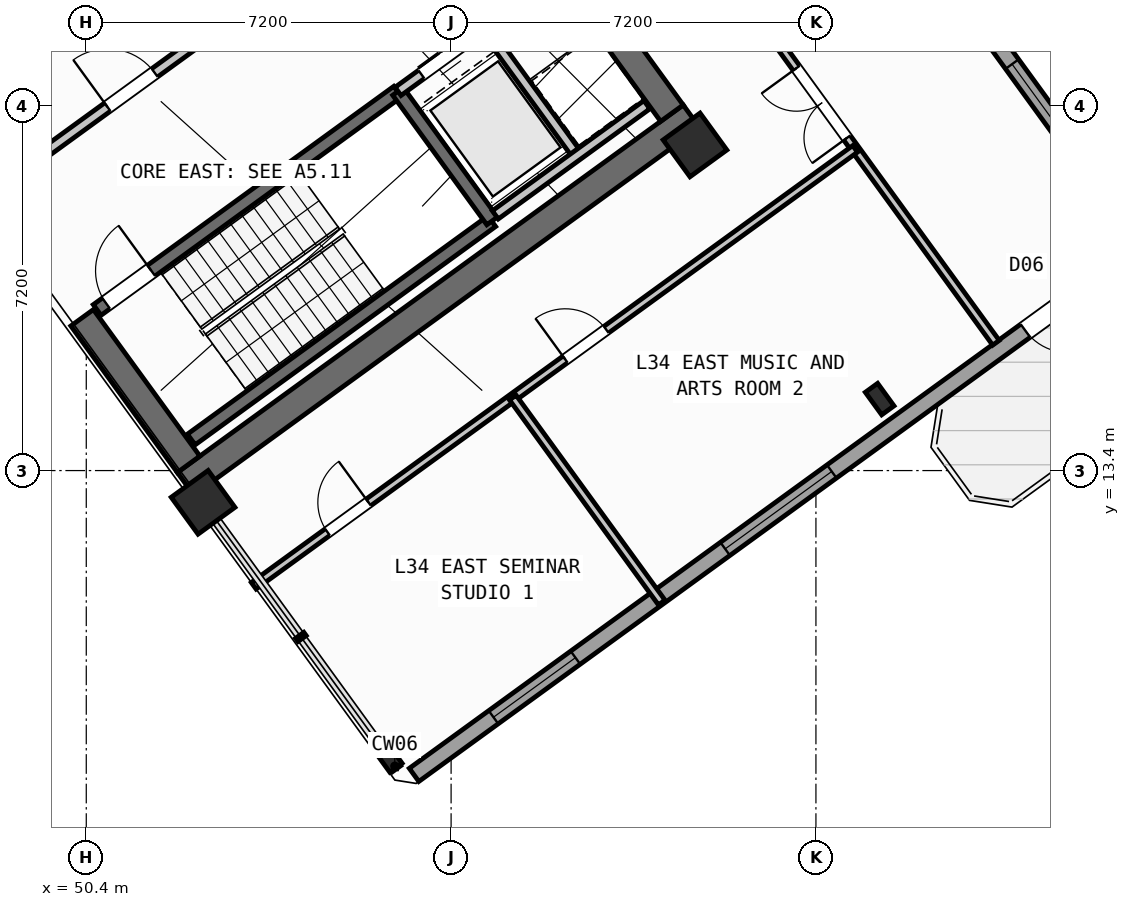
"""IFC4 building model, lengths in metres.
Left out: names, types, materials, properties, quantities, classifications, styles, units other than length and angle.
Written with IfcOpenShell. Run it as: python <this file> out.ifc"""

import sys

from ifc_helpers import new_model, si_unit, direction, frame, frame_2d, origin, origin_2d, place, context, subcontext, project, spatial, rectangle, hollow_rectangle, i_section, extrude, source, transform, mapped, element, fill, save


model = new_model("IFC4")
c1 = context("Model", 3, precision=1e-05, world=origin(), true_north=direction((0.0, 1.0)))
c2 = subcontext(c1, "Body", "Model", "MODEL_VIEW")
j1 = project(units=[si_unit("LENGTHUNIT", "METRE"), si_unit("PLANEANGLEUNIT", "RADIAN")], contexts=[c1])
p1 = place(None, origin())
s1 = spatial("IfcSite", under=j1, at=p1, CompositionType="ELEMENT")
p2 = place(p1, origin())
s2 = spatial("IfcBuilding", under=s1, at=p2, CompositionType="ELEMENT")
p3 = place(p2, frame((0.0, 0.0, 136.2)))
s3 = spatial("IfcBuildingStorey", under=s2, at=p3, CompositionType="ELEMENT", Elevation=136.2)
p4 = place(p3, frame((52.359, 13.14, 0.0), z_axis=(0.0, 0.0, 1.0), x_axis=(0.809014896919, 0.587788139183, 0.0)))
e1 = element("IfcWall", 1, at=p4, inside=s3, PredefinedType="SHEAR", context=c2, shape_type="SweptSolid", body=[
    extrude(rectangle(XDim=12.34, YDim=0.55, at=frame_2d((6.17, 0.0))), origin(), (0.0, 0.0, 1.0), 4.25),
])
for number, where, z_axis, x_axis in (
    (2, (52.42, 13.524, 0.0), (0.0, 0.0, 1.0), (-0.588, 0.809, 0.0)),
    (3, (61.958, 20.454, 0.0), (0.0, 0.0, 1.0), (-0.588, 0.809, 0.0)),
):
    element("IfcWall", number, at=place(p3, frame(where, z_axis=z_axis, x_axis=x_axis)), inside=s3, PredefinedType="SHEAR", context=c2, shape_type="SweptSolid", body=[
        extrude(rectangle(XDim=3.575, YDim=0.55, at=frame_2d((1.788, 0.0))), origin(), (0.0, 0.0, 1.0), 4.25),
    ])
m1 = source(origin(), c2, "Body", "SweptSolid", [
    extrude(i_section(OverallWidth=0.3, OverallDepth=0.55, WebThickness=0.015, FlangeThickness=0.029, at=origin_2d()), origin(), (0.0, 0.0, 1.0), 4.5),
])
p5 = place(p3, frame((56.35, 7.758, 0.0), z_axis=(0.0, 0.0, 1.0), x_axis=(0.809016994375, 0.587785252292, 0.0)))
e4 = element("IfcColumn", 4, at=p5, inside=s3, PredefinedType="COLUMN", context=c2, shape_type="MappedRepresentation", body=[
    mapped(m1, transform((0.0, 0.0, 0.0), scale=1.0)),
])
m2 = source(origin(), c2, "Body", "SweptSolid", [
    extrude(hollow_rectangle(XDim=0.9, YDim=0.9, WallThickness=0.036, at=origin_2d()), origin(), (0.0, 0.0, 1.0), 4.5),
])
p6 = place(p3, frame((52.705, 12.773, 0.0), z_axis=(0.0, 0.0, 1.0), x_axis=(0.809016994375, 0.587785252292, 0.0)))
e5 = element("IfcColumn", 5, at=p6, inside=s3, PredefinedType="COLUMN", context=c2, shape_type="MappedRepresentation", body=[
    mapped(m2, transform((0.0, 0.0, 0.0), scale=1.0)),
])
p7 = place(p3, frame((66.058, 14.811, 0.0), z_axis=(0.0, 0.0, 1.0), x_axis=(0.809016994375, 0.587785252292, 0.0)))
e6 = element("IfcColumn", 6, at=p7, inside=s3, PredefinedType="COLUMN", context=c2, shape_type="MappedRepresentation", body=[
    mapped(m1, transform((0.0, 0.0, 0.0), scale=1.0)),
])
p8 = place(p3, frame((62.414, 19.827, 0.0), z_axis=(0.0, 0.0, 1.0), x_axis=(0.809016994375, 0.587785252292, 0.0)))
e7 = element("IfcColumn", 7, at=p8, inside=s3, PredefinedType="COLUMN", context=c2, shape_type="MappedRepresentation", body=[
    mapped(m2, transform((0.0, 0.0, 0.0), scale=1.0)),
])
p9 = place(p3, frame((58.455, 35.484, 0.0), z_axis=(0.0, 0.0, 1.0), x_axis=(0.587783625747, -0.809018176127, 0.0)))
e8 = element("IfcWall", 8, at=p9, inside=s3, PredefinedType="STANDARD", context=c2, shape_type="SweptSolid", body=[
    extrude(rectangle(XDim=21.587, YDim=0.32, at=frame_2d((10.794, 0.0))), origin(), (0.0, 0.0, 1.0), 3.675),
])
p10 = place(p9, frame((2.744, 0.0, 0.7)))
e9 = element("IfcOpeningElement", 9, at=p10, cuts=e8, PredefinedType="OPENING", context=c2, shape_type="SweptSolid", body=[
    extrude(rectangle(XDim=2.6, YDim=2.0, at=frame_2d((1.3, 1.0))), frame((0.0, 0.17, 0.0), z_axis=(0.0, -1.0, 0.0), x_axis=(1.0, 0.0, 0.0)), (0.0, 0.0, 1.0), 0.34),
])
p11 = place(p9, frame((10.344, 0.0, 0.75)))
e10 = element("IfcOpeningElement", 10, at=p11, cuts=e8, PredefinedType="OPENING", context=c2, shape_type="SweptSolid", body=[
    extrude(rectangle(XDim=2.0, YDim=1.95, at=frame_2d((1.0, 0.975))), frame((0.0, 0.17, 0.0), z_axis=(0.0, -1.0, 0.0), x_axis=(1.0, 0.0, 0.0)), (0.0, 0.0, 1.0), 0.34),
])
p12 = place(p9, frame((17.381, 0.0, 0.85)))
e11 = element("IfcOpeningElement", 11, at=p12, cuts=e8, PredefinedType="OPENING", context=c2, shape_type="SweptSolid", body=[
    extrude(rectangle(XDim=1.6, YDim=1.8, at=frame_2d((0.8, 0.9))), frame((0.0, 0.17, 0.0), z_axis=(0.0, -1.0, 0.0), x_axis=(1.0, 0.0, 0.0)), (0.0, 0.0, 1.0), 0.34),
])
p13 = place(p3, frame((71.098, 17.731, 0.0), z_axis=(0.0, 0.0, 1.0), x_axis=(-0.809021120468, -0.587779573171, 0.0)))
e12 = element("IfcWall", 12, at=p13, inside=s3, PredefinedType="STANDARD", context=c2, shape_type="SweptSolid", body=[
    extrude(rectangle(XDim=17.588, YDim=0.32, at=frame_2d((8.794, 0.0))), origin(), (0.0, 0.0, 1.0), 4.25),
])
p14 = place(p13, frame((1.624, 0.0, 0.0)))
e13 = element("IfcOpeningElement", 13, at=p14, cuts=e12, PredefinedType="OPENING", context=c2, shape_type="SweptSolid", body=[
    extrude(rectangle(XDim=1.05, YDim=2.15, at=frame_2d((0.525, 1.075))), frame((0.0, 0.17, 0.0), z_axis=(0.0, -1.0, 0.0), x_axis=(1.0, 0.0, 0.0)), (0.0, 0.0, 1.0), 0.34),
])
p15 = place(p13, frame((7.399, 0.0, 0.7)))
e14 = element("IfcOpeningElement", 14, at=p15, cuts=e12, PredefinedType="OPENING", context=c2, shape_type="SweptSolid", body=[
    extrude(rectangle(XDim=2.6, YDim=2.0, at=frame_2d((1.3, 1.0))), frame((0.0, 0.17, 0.0), z_axis=(0.0, -1.0, 0.0), x_axis=(1.0, 0.0, 0.0)), (0.0, 0.0, 1.0), 0.34),
])
p16 = place(p13, frame((13.651, 0.0, 0.75)))
e15 = element("IfcOpeningElement", 15, at=p16, cuts=e12, PredefinedType="OPENING", context=c2, shape_type="SweptSolid", body=[
    extrude(rectangle(XDim=2.0, YDim=1.95, at=frame_2d((1.0, 0.975))), frame((0.0, 0.17, 0.0), z_axis=(0.0, -1.0, 0.0), x_axis=(1.0, 0.0, 0.0)), (0.0, 0.0, 1.0), 0.34),
])
p17 = place(p3, frame((52.472, 14.013, 0.0), z_axis=(0.0, 0.0, 1.0), x_axis=(0.809028366311, 0.587769599847, 0.0)))
e16 = element("IfcWall", 16, at=p17, inside=s3, PredefinedType="SHEAR", context=c2, shape_type="SweptSolid", body=[
    extrude(rectangle(XDim=7.33, YDim=0.26, at=frame_2d((3.665, 0.0))), origin(), (0.0, 0.0, 1.0), 4.25),
])
p18 = place(p3, frame((50.615, 16.57, 0.0), z_axis=(0.0, 0.0, 1.0), x_axis=(0.809028366311, 0.587769599847, 0.0)))
e17 = element("IfcWall", 17, at=p18, inside=s3, PredefinedType="SHEAR", context=c2, shape_type="SweptSolid", body=[
    extrude(rectangle(XDim=7.33, YDim=0.26, at=frame_2d((3.665, 0.0))), origin(), (0.0, 0.0, 1.0), 4.25),
])
p19 = place(p18, frame((0.22, 0.0, 0.0)))
e18 = element("IfcOpeningElement", 18, at=p19, cuts=e17, PredefinedType="OPENING", context=c2, shape_type="SweptSolid", body=[
    extrude(rectangle(XDim=1.1, YDim=2.1, at=frame_2d((0.55, 1.05))), frame((0.0, 0.14, 0.0), z_axis=(0.0, -1.0, 0.0), x_axis=(1.0, 0.0, 0.0)), (0.0, 0.0, 1.0), 0.28),
])
p20 = place(p3, frame((58.41, 18.327, 0.0), z_axis=(0.0, 0.0, 1.0), x_axis=(-0.58776738483, 0.809029975545, 0.0)))
e19 = element("IfcWall", 19, at=p20, inside=s3, PredefinedType="SHEAR", context=c2, shape_type="SweptSolid", body=[
    extrude(rectangle(XDim=3.16, YDim=0.26, at=frame_2d((1.58, 0.0))), origin(), (0.0, 0.0, 1.0), 4.25),
])
p21 = place(p3, frame((47.065, 21.407, 0.0), z_axis=(0.0, 0.0, 1.0), x_axis=(0.809032984992, 0.587763242466, 0.0)))
e20 = element("IfcWall", 20, at=p21, inside=s3, PredefinedType="STANDARD", context=c2, shape_type="SweptSolid", body=[
    extrude(rectangle(XDim=3.448, YDim=0.2, at=frame_2d((1.724, 0.0))), origin(), (0.0, 0.0, 1.0), 4.24),
])
p22 = place(p21, frame((0.458, 0.0, 0.0)))
e21 = element("IfcOpeningElement", 21, at=p22, cuts=e20, PredefinedType="OPENING", context=c2, shape_type="SweptSolid", body=[
    extrude(rectangle(XDim=1.3, YDim=2.2, at=frame_2d((0.65, 1.1))), frame((0.0, 0.11, 0.0), z_axis=(0.0, -1.0, 0.0), x_axis=(1.0, 0.0, 0.0)), (0.0, 0.0, 1.0), 0.22),
])
p23 = place(p3, frame((48.758, 19.077, 0.0), z_axis=(0.0, 0.0, 1.0), x_axis=(0.809005065155, 0.587801671104, 0.0)))
e22 = element("IfcWall", 22, at=p23, inside=s3, PredefinedType="STANDARD", context=c2, shape_type="SweptSolid", body=[
    extrude(rectangle(XDim=5.768, YDim=0.2, at=frame_2d((2.884, 0.0))), origin(), (0.0, 0.0, 1.0), 4.24),
])
p24 = place(p23, frame((2.548, 0.0, 0.0)))
e23 = element("IfcOpeningElement", 23, at=p24, cuts=e22, PredefinedType="OPENING", context=c2, shape_type="SweptSolid", body=[
    extrude(rectangle(XDim=1.15, YDim=2.1, at=frame_2d((0.575, 1.05))), frame((0.0, 0.11, 0.0), z_axis=(0.0, -1.0, 0.0), x_axis=(1.0, 0.0, 0.0)), (0.0, 0.0, 1.0), 0.22),
])
p25 = place(p3, frame((56.553, 20.884, 0.0), z_axis=(0.0, 0.0, 1.0), x_axis=(0.809023564264, 0.58777620951, 0.0)))
e24 = element("IfcWall", 24, at=p25, inside=s3, PredefinedType="STANDARD", context=c2, shape_type="SweptSolid", body=[
    extrude(rectangle(XDim=3.818, YDim=0.2, at=frame_2d((1.909, 0.0))), origin(), (0.0, 0.0, 1.0), 4.24),
])
p26 = place(p25, frame((0.57, 0.0, 0.0)))
e25 = element("IfcOpeningElement", 25, at=p26, cuts=e24, PredefinedType="OPENING", context=c2, shape_type="SweptSolid", body=[
    extrude(rectangle(XDim=1.1, YDim=2.15, at=frame_2d((0.55, 1.075))), frame((0.0, 0.11, 0.0), z_axis=(0.0, -1.0, 0.0), x_axis=(1.0, 0.0, 0.0)), (0.0, 0.0, 1.0), 0.22),
])
p27 = place(p25, frame((2.65, 0.0, 0.0)))
e26 = element("IfcOpeningElement", 26, at=p27, cuts=e24, PredefinedType="OPENING", context=c2, shape_type="SweptSolid", body=[
    extrude(rectangle(XDim=0.86, YDim=2.05, at=frame_2d((0.43, 1.025))), frame((0.0, 0.11, 0.0), z_axis=(0.0, -1.0, 0.0), x_axis=(1.0, 0.0, 0.0)), (0.0, 0.0, 1.0), 0.22),
])
p28 = place(p3, frame((60.067, 19.655, 0.0), z_axis=(0.0, 0.0, 1.0), x_axis=(-0.587800520745, 0.809005900975, 0.0)))
e27 = element("IfcWall", 27, at=p28, inside=s3, PredefinedType="STANDARD", context=c2, shape_type="SweptSolid", body=[
    extrude(rectangle(XDim=2.66, YDim=0.2, at=frame_2d((1.33, 0.0))), origin(), (0.0, 0.0, 1.0), 4.24),
])
p29 = place(p3, frame((58.472, 18.447, 0.0), z_axis=(0.0, 0.0, 1.0), x_axis=(0.809018631237, 0.587782999339, 0.0)))
e28 = element("IfcWall", 28, at=p29, inside=s3, PredefinedType="STANDARD", context=c2, shape_type="SweptSolid", body=[
    extrude(rectangle(XDim=3.698, YDim=0.2, at=frame_2d((1.849, 0.0))), origin(), (0.0, 0.0, 1.0), 4.24),
])
p30 = place(p3, frame((68.353, 15.922, 0.0), z_axis=(0.0, 0.0, 1.0), x_axis=(-0.587783631512, 0.809018171939, 0.0)))
e29 = element("IfcWall", 29, at=p30, inside=s3, PredefinedType="PARTITIONING", context=c2, shape_type="SweptSolid", body=[
    extrude(rectangle(XDim=21.7, YDim=0.16, at=frame_2d((10.85, 0.0))), origin(), (0.0, 0.0, 1.0), 4.24),
])
p31 = place(p30, frame((5.0, 0.0, 0.0)))
e30 = element("IfcOpeningElement", 30, at=p31, cuts=e29, PredefinedType="OPENING", context=c2, shape_type="SweptSolid", body=[
    extrude(rectangle(XDim=1.7, YDim=2.2, at=frame_2d((0.85, 1.1))), frame((0.0, 0.09, 0.0), z_axis=(0.0, -1.0, 0.0), x_axis=(1.0, 0.0, 0.0)), (0.0, 0.0, 1.0), 0.18),
])
p32 = place(p3, frame((53.705, 11.126, 0.0), z_axis=(0.0, 0.0, 1.0), x_axis=(0.809014504436, 0.587788679384, 0.0)))
e31 = element("IfcWall", 31, at=p32, inside=s3, PredefinedType="PARTITIONING", context=c2, shape_type="SweptSolid", body=[
    extrude(rectangle(XDim=14.67, YDim=0.16, at=frame_2d((7.335, 0.0))), origin(), (0.0, 0.0, 1.0), 4.24),
])
p33 = place(p32, frame((1.8, 0.0, 0.0)))
e32 = element("IfcOpeningElement", 32, at=p33, cuts=e31, PredefinedType="OPENING", context=c2, shape_type="SweptSolid", body=[
    extrude(rectangle(XDim=1.0, YDim=2.1, at=frame_2d((0.5, 1.05))), frame((0.0, 0.09, 0.0), z_axis=(0.0, -1.0, 0.0), x_axis=(1.0, 0.0, 0.0)), (0.0, 0.0, 1.0), 0.18),
])
p34 = place(p32, frame((7.6, 0.0, 0.0)))
e33 = element("IfcOpeningElement", 33, at=p34, cuts=e31, PredefinedType="OPENING", context=c2, shape_type="SweptSolid", body=[
    extrude(rectangle(XDim=1.0, YDim=2.1, at=frame_2d((0.5, 1.05))), frame((0.0, 0.09, 0.0), z_axis=(0.0, -1.0, 0.0), x_axis=(1.0, 0.0, 0.0)), (0.0, 0.0, 1.0), 0.18),
])
p35 = place(p3, frame((61.756, 10.796, 0.0), z_axis=(0.0, 0.0, 1.0), x_axis=(-0.587782595105, 0.809018924928, 0.0)))
e34 = element("IfcWall", 34, at=p35, inside=s3, PredefinedType="PARTITIONING", context=c2, shape_type="SweptSolid", body=[
    extrude(rectangle(XDim=5.0, YDim=0.16, at=frame_2d((2.5, 0.0))), origin(), (0.0, 0.0, 1.0), 4.24),
])
m3 = source(origin(), c2, "Body", "SweptSolid", [
    extrude(rectangle(XDim=1.05, YDim=2.15, at=frame_2d((0.525, 1.075))), frame((0.0, 0.025, 0.0), z_axis=(0.0, -1.0, 0.0), x_axis=(1.0, 0.0, 0.0)), (0.0, 0.0, 1.0), 0.05),
])
p36 = place(p14, origin())
e35 = element("IfcDoor", 35, at=p36, inside=s3, OperationType="SINGLE_SWING_LEFT", PredefinedType="DOOR", context=c2, shape_type="MappedRepresentation", body=[
    mapped(m3, transform((0.0, 0.0, 0.0), scale=1.0)),
])
fill(e13, e35)
m4 = source(origin(), c2, "Body", "SweptSolid", [
    extrude(rectangle(XDim=1.6, YDim=1.8, at=frame_2d((0.8, 0.9))), frame((0.0, 0.03, 0.0), z_axis=(0.0, -1.0, 0.0), x_axis=(1.0, 0.0, 0.0)), (0.0, 0.0, 1.0), 0.06),
])
p37 = place(p12, origin())
e36 = element("IfcWindow", 36, at=p37, inside=s3, PartitioningType="SINGLE_PANEL", PredefinedType="WINDOW", context=c2, shape_type="MappedRepresentation", body=[
    mapped(m4, transform((0.0, 0.0, 0.0), scale=1.0)),
])
fill(e11, e36)
m5 = source(origin(), c2, "Body", "SweptSolid", [
    extrude(rectangle(XDim=2.6, YDim=2.0, at=frame_2d((1.3, 1.0))), frame((0.0, 0.03, 0.0), z_axis=(0.0, -1.0, 0.0), x_axis=(1.0, 0.0, 0.0)), (0.0, 0.0, 1.0), 0.06),
])
p38 = place(p15, origin())
e37 = element("IfcWindow", 37, at=p38, inside=s3, PartitioningType="SINGLE_PANEL", PredefinedType="WINDOW", context=c2, shape_type="MappedRepresentation", body=[
    mapped(m5, transform((0.0, 0.0, 0.0), scale=1.0)),
])
fill(e14, e37)
m6 = source(origin(), c2, "Body", "SweptSolid", [
    extrude(rectangle(XDim=2.0, YDim=1.95, at=frame_2d((1.0, 0.975))), frame((0.0, 0.03, 0.0), z_axis=(0.0, -1.0, 0.0), x_axis=(1.0, 0.0, 0.0)), (0.0, 0.0, 1.0), 0.06),
])
p39 = place(p16, origin())
e38 = element("IfcWindow", 38, at=p39, inside=s3, PartitioningType="SINGLE_PANEL", PredefinedType="WINDOW", context=c2, shape_type="MappedRepresentation", body=[
    mapped(m6, transform((0.0, 0.0, 0.0), scale=1.0)),
])
fill(e15, e38)
m7 = source(origin(), c2, "Body", "SweptSolid", [
    extrude(rectangle(XDim=1.1, YDim=2.1, at=frame_2d((0.55, 1.05))), frame((0.0, 0.025, 0.0), z_axis=(0.0, -1.0, 0.0), x_axis=(1.0, 0.0, 0.0)), (0.0, 0.0, 1.0), 0.05),
])
p40 = place(p19, origin())
e39 = element("IfcDoor", 39, at=p40, inside=s3, OperationType="SINGLE_SWING_RIGHT", PredefinedType="DOOR", context=c2, shape_type="MappedRepresentation", body=[
    mapped(m7, transform((0.0, 0.0, 0.0), scale=1.0)),
])
fill(e18, e39)
m8 = source(origin(), c2, "Body", "SweptSolid", [
    extrude(rectangle(XDim=1.15, YDim=2.1, at=frame_2d((0.575, 1.05))), frame((0.0, 0.025, 0.0), z_axis=(0.0, -1.0, 0.0), x_axis=(1.0, 0.0, 0.0)), (0.0, 0.0, 1.0), 0.05),
])
p41 = place(p24, origin())
e40 = element("IfcDoor", 40, at=p41, inside=s3, OperationType="SINGLE_SWING_LEFT", PredefinedType="DOOR", context=c2, shape_type="MappedRepresentation", body=[
    mapped(m8, transform((0.0, 0.0, 0.0), scale=1.0)),
])
fill(e23, e40)
m9 = source(origin(), c2, "Body", "SweptSolid", [
    extrude(rectangle(XDim=1.1, YDim=2.15, at=frame_2d((0.55, 1.075))), frame((0.0, 0.025, 0.0), z_axis=(0.0, -1.0, 0.0), x_axis=(1.0, 0.0, 0.0)), (0.0, 0.0, 1.0), 0.05),
])
p42 = place(p26, origin())
e41 = element("IfcDoor", 41, at=p42, inside=s3, OperationType="DOUBLE_DOOR_SLIDING", PredefinedType="DOOR", context=c2, shape_type="MappedRepresentation", body=[
    mapped(m9, transform((0.0, 0.0, 0.0), scale=1.0)),
])
fill(e25, e41)
m10 = source(origin(), c2, "Body", "SweptSolid", [
    extrude(rectangle(XDim=1.7, YDim=2.2, at=frame_2d((0.85, 1.1))), frame((0.0, 0.025, 0.0), z_axis=(0.0, -1.0, 0.0), x_axis=(1.0, 0.0, 0.0)), (0.0, 0.0, 1.0), 0.05),
])
p43 = place(p31, origin())
e42 = element("IfcDoor", 42, at=p43, inside=s3, OperationType="DOUBLE_DOOR_SINGLE_SWING", PredefinedType="DOOR", context=c2, shape_type="MappedRepresentation", body=[
    mapped(m10, transform((0.0, 0.0, 0.0), scale=1.0)),
])
fill(e30, e42)
m11 = source(origin(), c2, "Body", "SweptSolid", [
    extrude(rectangle(XDim=1.0, YDim=2.1, at=frame_2d((0.5, 1.05))), frame((0.0, 0.025, 0.0), z_axis=(0.0, -1.0, 0.0), x_axis=(1.0, 0.0, 0.0)), (0.0, 0.0, 1.0), 0.05),
])
p44 = place(p33, origin())
e43 = element("IfcDoor", 43, at=p44, inside=s3, OperationType="SINGLE_SWING_RIGHT", PredefinedType="DOOR", context=c2, shape_type="MappedRepresentation", body=[
    mapped(m11, transform((0.0, 0.0, 0.0), scale=1.0)),
])
fill(e32, e43)
p45 = place(p34, origin())
e44 = element("IfcDoor", 44, at=p45, inside=s3, OperationType="SINGLE_SWING_LEFT", PredefinedType="DOOR", context=c2, shape_type="MappedRepresentation", body=[
    mapped(m11, transform((0.0, 0.0, 0.0), scale=1.0)),
])
fill(e33, e44)
save(model, sys.argv[1])
